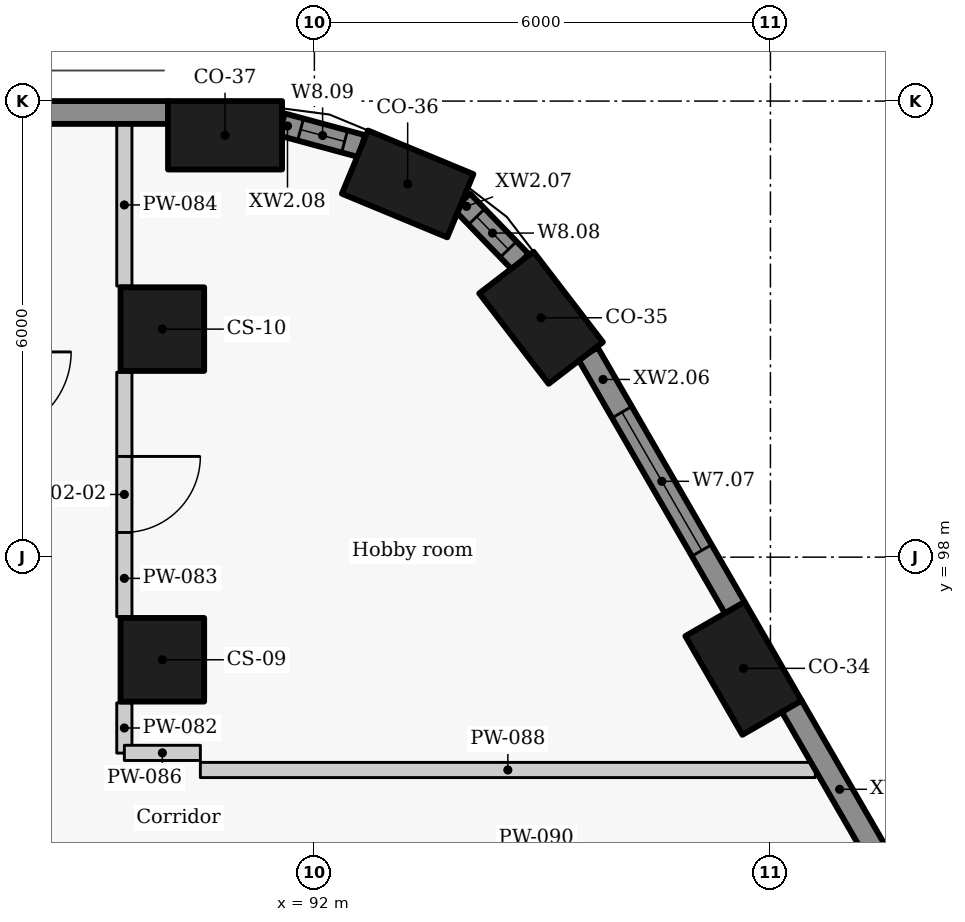
"""IFC4 building model, lengths in metres.
Left out: names, types, materials, properties, quantities, classifications, styles, units other than length and angle.
Written with IfcOpenShell. Run it as: python <this file> out.ifc"""

import sys

from ifc_helpers import new_model, si_unit, direction, frame, frame_2d, origin, origin_2d, place, context, subcontext, project, spatial, rectangle, extrude, element, fill, save


model = new_model("IFC4")
c1 = context("Model", 3, precision=1e-05, world=origin(), true_north=direction((0.0, 1.0)))
c2 = subcontext(c1, "Body", "Model", "MODEL_VIEW")
j1 = project(units=[si_unit("LENGTHUNIT", "METRE"), si_unit("PLANEANGLEUNIT", "RADIAN")], contexts=[c1])
p1 = place(None, origin())
s1 = spatial("IfcSite", under=j1, at=p1, CompositionType="ELEMENT")
p2 = place(p1, origin())
s2 = spatial("IfcBuilding", under=s1, at=p2, CompositionType="ELEMENT")
p3 = place(p2, frame((0.0, 0.0, 41.4)))
s3 = spatial("IfcBuildingStorey", under=s2, at=p3, CompositionType="ELEMENT", Elevation=41.4)
for number, where, z_axis, x_axis in (
    (1, (97.646, 96.537, 0.0), (0.0, 0.0, 1.0), (-0.5, 0.866, 0.0)),
    (2, (94.982, 101.149, 0.0), (0.0, 0.0, 1.0), (-0.609, 0.793, 0.0)),
    (3, (93.227, 102.91, 0.0), (0.0, 0.0, 1.0), (-0.924, 0.383, 0.0)),
    (4, (90.825, 103.55, 0.0), (0.0, 0.0, 1.0), (-1.0, 0.0, 0.0)),
):
    element("IfcColumn", number, at=place(p3, frame(where, z_axis=z_axis, x_axis=x_axis)), inside=s3, PredefinedType="COLUMN", context=c2, shape_type="SweptSolid", body=[
        extrude(rectangle(XDim=1.5, YDim=0.9, at=origin_2d()), origin(), (0.0, 0.0, 1.0), 3.3),
    ])
for number, where, z_axis, x_axis in (
    (5, (90.0, 96.65, 0.0), (0.0, 0.0, 1.0), (0.0, 1.0, 0.0)),
    (6, (90.0, 101.0, 0.0), (0.0, 0.0, 1.0), (0.0, 1.0, 0.0)),
):
    element("IfcColumn", number, at=place(p3, frame(where, z_axis=z_axis, x_axis=x_axis)), inside=s3, PredefinedType="COLUMN", context=c2, shape_type="SweptSolid", body=[
        extrude(rectangle(XDim=1.1, YDim=1.1, at=origin_2d()), origin(), (0.0, 0.0, 1.0), 3.3),
    ])
p4 = place(p3, frame((100.195, 92.721, 0.0), z_axis=(0.0, 0.0, 1.0), x_axis=(-0.500001735503, 0.866024401789, 0.0)))
e7 = element("IfcWall", 7, at=p4, inside=s3, PredefinedType="SOLIDWALL", context=c2, shape_type="SweptSolid", body=[
    extrude(rectangle(XDim=3.834, YDim=0.3, at=frame_2d((1.917, 0.0))), origin(), (0.0, 0.0, 1.0), 2.425),
])
p5 = place(p4, frame((0.305, 0.0, 0.9)))
e8 = element("IfcOpeningElement", 8, at=p5, cuts=e7, PredefinedType="OPENING", context=c2, shape_type="SweptSolid", body=[
    extrude(rectangle(XDim=0.9, YDim=1.1, at=frame_2d((0.45, 0.55))), frame((0.0, 0.16, 0.0), z_axis=(0.0, -1.0, 0.0), x_axis=(1.0, 0.0, 0.0)), (0.0, 0.0, 1.0), 0.32),
])
p6 = place(p3, frame((97.532, 97.333, 0.0), z_axis=(0.0, 0.0, 1.0), x_axis=(-0.499948341072, 0.866055227026, 0.0)))
e9 = element("IfcWall", 9, at=p6, inside=s3, PredefinedType="SOLIDWALL", context=c2, shape_type="SweptSolid", body=[
    extrude(rectangle(XDim=3.867, YDim=0.3, at=frame_2d((1.934, 0.0))), origin(), (0.0, 0.0, 1.0), 2.425),
])
p7 = place(p6, frame((0.872, 0.0, 0.9)))
e10 = element("IfcOpeningElement", 10, at=p7, cuts=e9, PredefinedType="OPENING", context=c2, shape_type="SweptSolid", body=[
    extrude(rectangle(XDim=2.1, YDim=1.1, at=frame_2d((1.05, 0.55))), frame((0.0, 0.16, 0.0), z_axis=(0.0, -1.0, 0.0), x_axis=(1.0, 0.0, 0.0)), (0.0, 0.0, 1.0), 0.32),
])
p8 = place(p3, frame((94.713, 101.883, 0.0), z_axis=(0.0, 0.0, 1.0), x_axis=(-0.696138968055, 0.717907053285, 0.0)))
e11 = element("IfcWall", 11, at=p8, inside=s3, PredefinedType="SOLIDWALL", context=c2, shape_type="SweptSolid", body=[
    extrude(rectangle(XDim=1.11, YDim=0.3, at=frame_2d((0.555, 0.0))), origin(), (0.0, 0.0, 1.0), 2.425),
])
p9 = place(p8, frame((0.231, 0.0, 0.9)))
e12 = element("IfcOpeningElement", 12, at=p9, cuts=e11, PredefinedType="OPENING", context=c2, shape_type="SweptSolid", body=[
    extrude(rectangle(XDim=0.6, YDim=1.1, at=frame_2d((0.3, 0.55))), frame((0.0, 0.16, 0.0), z_axis=(0.0, -1.0, 0.0), x_axis=(1.0, 0.0, 0.0)), (0.0, 0.0, 1.0), 0.32),
])
p10 = place(p3, frame((92.625, 103.407, 0.0), z_axis=(0.0, 0.0, 1.0), x_axis=(-0.96522637192, 0.261415475728, 0.0)))
e13 = element("IfcWall", 13, at=p10, inside=s3, PredefinedType="SOLIDWALL", context=c2, shape_type="SweptSolid", body=[
    extrude(rectangle(XDim=1.093, YDim=0.3, at=frame_2d((0.546, 0.0))), origin(), (0.0, 0.0, 1.0), 2.425),
])
p11 = place(p10, frame((0.236, 0.0, 0.9)))
e14 = element("IfcOpeningElement", 14, at=p11, cuts=e13, PredefinedType="OPENING", context=c2, shape_type="SweptSolid", body=[
    extrude(rectangle(XDim=0.6, YDim=1.1, at=frame_2d((0.3, 0.55))), frame((0.0, 0.16, 0.0), z_axis=(0.0, -1.0, 0.0), x_axis=(1.0, 0.0, 0.0)), (0.0, 0.0, 1.0), 0.32),
])
p12 = place(p3, frame((90.079, 103.85, 0.0), z_axis=(0.0, 0.0, 1.0), x_axis=(-1.0, 0.0, 0.0)))
e15 = element("IfcWall", 15, at=p12, inside=s3, PredefinedType="SOLIDWALL", context=c2, shape_type="SweptSolid", body=[
    extrude(rectangle(XDim=20.19, YDim=0.3, at=frame_2d((10.095, 0.0))), origin(), (0.0, 0.0, 1.0), 2.425),
])
p13 = place(p3, frame((89.5, 95.422, 0.0), z_axis=(0.0, 0.0, 1.0), x_axis=(0.0, 1.0, 0.0)))
e16 = element("IfcWall", 16, at=p13, inside=s3, PredefinedType="PARTITIONING", context=c2, shape_type="SweptSolid", body=[
    extrude(rectangle(XDim=0.661, YDim=0.2, at=frame_2d((0.331, 0.0))), origin(), (0.0, 0.0, 1.0), 3.025),
])
p14 = place(p3, frame((89.5, 100.433, 0.0), z_axis=(0.0, 0.0, 1.0), x_axis=(0.0, -1.0, 0.0)))
e17 = element("IfcWall", 17, at=p14, inside=s3, PredefinedType="PARTITIONING", context=c2, shape_type="SweptSolid", body=[
    extrude(rectangle(XDim=3.216, YDim=0.2, at=frame_2d((1.608, 0.0))), origin(), (0.0, 0.0, 1.0), 3.025),
])
p15 = place(p14, frame((1.108, 0.0, 0.0)))
e18 = element("IfcOpeningElement", 18, at=p15, cuts=e17, PredefinedType="OPENING", context=c2, shape_type="SweptSolid", body=[
    extrude(rectangle(XDim=1.0, YDim=2.1, at=frame_2d((0.5, 1.05))), frame((0.0, 0.11, 0.0), z_axis=(0.0, -1.0, 0.0), x_axis=(1.0, 0.0, 0.0)), (0.0, 0.0, 1.0), 0.22),
])
p16 = place(p3, frame((89.5, 101.567, 0.0), z_axis=(0.0, 0.0, 1.0), x_axis=(0.0, 1.0, 0.0)))
e19 = element("IfcWall", 19, at=p16, inside=s3, PredefinedType="PARTITIONING", context=c2, shape_type="SweptSolid", body=[
    extrude(rectangle(XDim=2.133, YDim=0.2, at=frame_2d((1.066, 0.0))), origin(), (0.0, 0.0, 1.0), 3.025),
])
p17 = place(p3, frame((89.5, 95.425, 0.0), z_axis=(0.0, 0.0, 1.0), x_axis=(1.0, 0.0, 0.0)))
e20 = element("IfcWall", 20, at=p17, inside=s3, PredefinedType="PARTITIONING", context=c2, shape_type="SweptSolid", body=[
    extrude(rectangle(XDim=1.0, YDim=0.2, at=frame_2d((0.5, 0.0))), origin(), (0.0, 0.0, 1.0), 2.505),
])
p18 = place(p3, frame((90.5, 95.2, 0.0), z_axis=(0.0, 0.0, 1.0), x_axis=(1.0, 0.0, 0.0)))
e21 = element("IfcWall", 21, at=p18, inside=s3, PredefinedType="PARTITIONING", context=c2, shape_type="SweptSolid", body=[
    extrude(rectangle(XDim=8.091, YDim=0.2, at=frame_2d((4.045, 0.0))), origin(), (0.0, 0.0, 1.0), 2.405),
])
p19 = place(p7, origin())
e22 = element("IfcWindow", 22, at=p19, inside=s3, PartitioningType="SINGLE_PANEL", PredefinedType="WINDOW", context=c2, shape_type="SweptSolid", body=[
    extrude(rectangle(XDim=2.1, YDim=1.1, at=frame_2d((1.05, 0.55))), frame((0.0, 0.03, 0.0), z_axis=(0.0, -1.0, 0.0), x_axis=(1.0, 0.0, 0.0)), (0.0, 0.0, 1.0), 0.06),
])
fill(e10, e22)
p20 = place(p9, origin())
e23 = element("IfcWindow", 23, at=p20, inside=s3, PartitioningType="SINGLE_PANEL", PredefinedType="WINDOW", context=c2, shape_type="SweptSolid", body=[
    extrude(rectangle(XDim=0.6, YDim=1.1, at=frame_2d((0.3, 0.55))), frame((0.0, 0.03, 0.0), z_axis=(0.0, -1.0, 0.0), x_axis=(1.0, 0.0, 0.0)), (0.0, 0.0, 1.0), 0.06),
])
fill(e12, e23)
p21 = place(p11, origin())
e24 = element("IfcWindow", 24, at=p21, inside=s3, PartitioningType="SINGLE_PANEL", PredefinedType="WINDOW", context=c2, shape_type="SweptSolid", body=[
    extrude(rectangle(XDim=0.6, YDim=1.1, at=frame_2d((0.3, 0.55))), frame((0.0, 0.03, 0.0), z_axis=(0.0, -1.0, 0.0), x_axis=(1.0, 0.0, 0.0)), (0.0, 0.0, 1.0), 0.06),
])
fill(e14, e24)
p22 = place(p15, origin())
e25 = element("IfcDoor", 25, at=p22, inside=s3, OperationType="SINGLE_SWING_LEFT", PredefinedType="DOOR", context=c2, shape_type="SweptSolid", body=[
    extrude(rectangle(XDim=1.0, YDim=2.1, at=frame_2d((0.5, 1.05))), frame((0.0, 0.025, 0.0), z_axis=(0.0, -1.0, 0.0), x_axis=(1.0, 0.0, 0.0)), (0.0, 0.0, 1.0), 0.05),
])
fill(e18, e25)
save(model, sys.argv[1])
